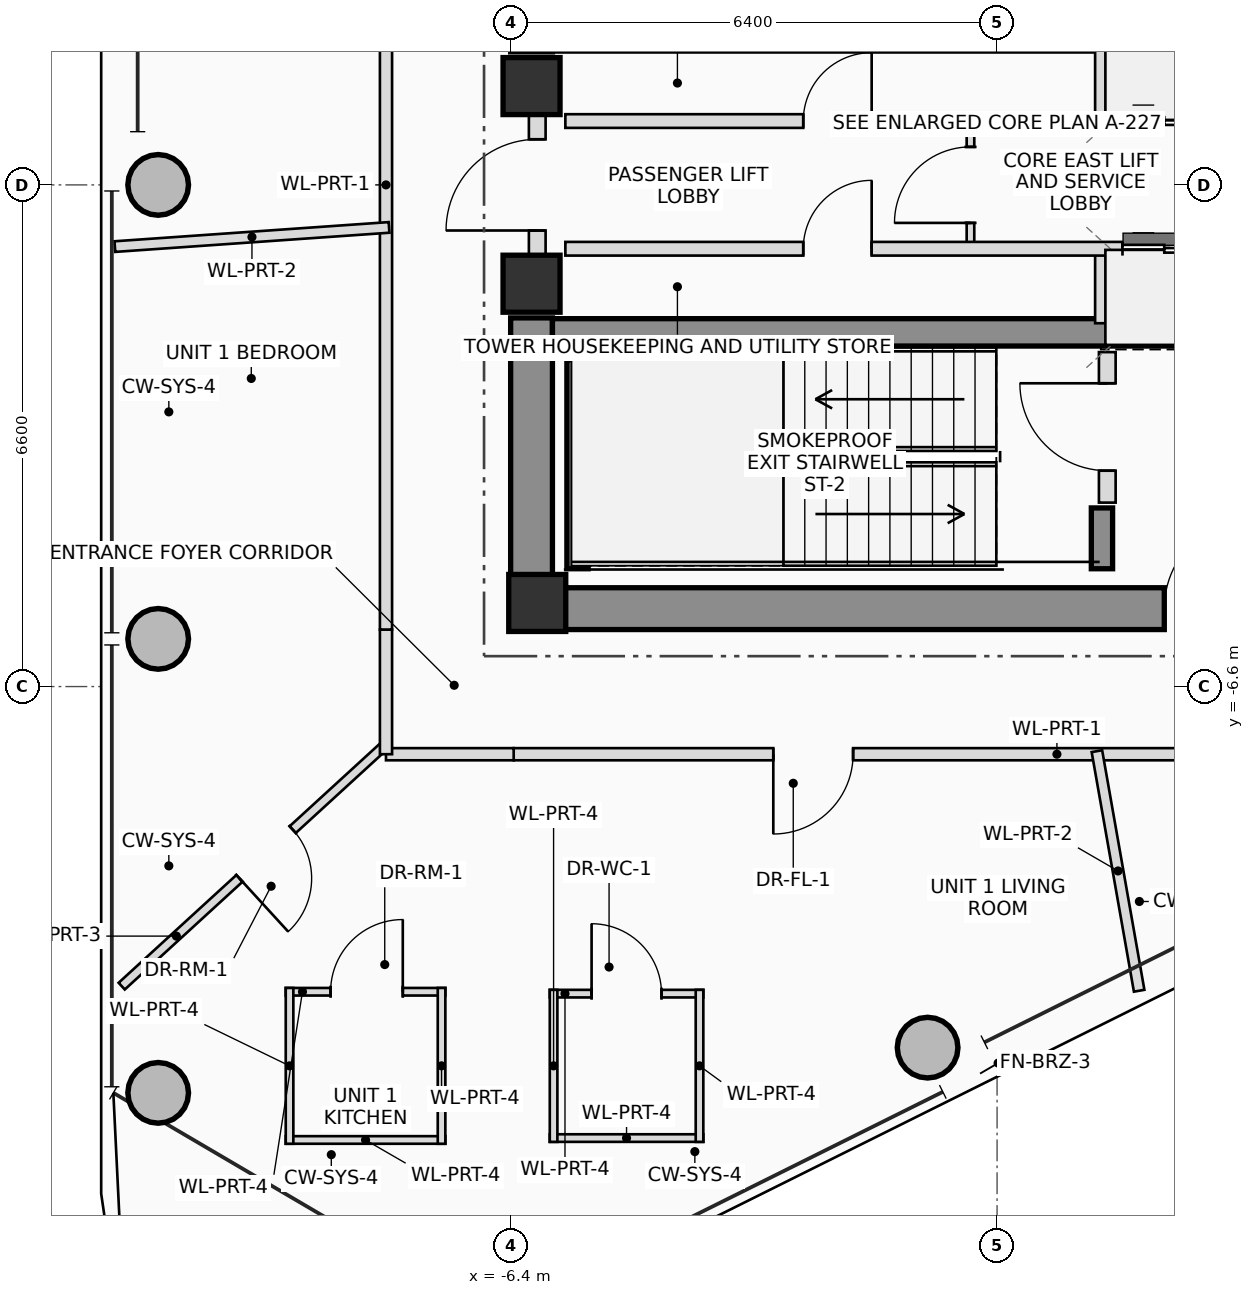
"""IFC4 building model, lengths in metres.
Left out: names, types, materials, properties, quantities, classifications, styles, units other than length and angle.
Written with IfcOpenShell. Run it as: python <this file> out.ifc"""

import sys

from ifc_helpers import new_model, si_unit, direction, frame, frame_2d, origin, origin_2d, place, context, subcontext, project, spatial, rectangle, hollow_circle, extrude, source, transform, mapped, element, fill, save


model = new_model("IFC4")
c1 = context("Model", 3, precision=1e-05, world=origin(), true_north=direction((0.0, 1.0)))
c2 = subcontext(c1, "Body", "Model", "MODEL_VIEW")
j1 = project(units=[si_unit("LENGTHUNIT", "METRE"), si_unit("PLANEANGLEUNIT", "RADIAN")], contexts=[c1])
p1 = place(None, origin())
s1 = spatial("IfcSite", under=j1, at=p1, CompositionType="ELEMENT")
p2 = place(p1, origin())
s2 = spatial("IfcBuilding", under=s1, at=p2, CompositionType="ELEMENT")
p3 = place(p2, frame((0.0, 0.0, 300.2)))
s3 = spatial("IfcBuildingStorey", under=s2, at=p3, CompositionType="ELEMENT", Elevation=300.2)
m1 = source(origin(), c2, "Body", "SweptSolid", [
    extrude(rectangle(XDim=0.75, YDim=0.75, at=origin_2d()), origin(), (0.0, 0.0, 1.0), 3.45),
])
p4 = place(p3, frame((-6.05, -5.5, 0.0), z_axis=(0.0, 0.0, 1.0), x_axis=(1.0, 0.0, 0.0)))
e1 = element("IfcColumn", 1, at=p4, inside=s3, PredefinedType="COLUMN", context=c2, shape_type="MappedRepresentation", body=[
    mapped(m1, transform((0.0, 0.0, 0.0), scale=1.0)),
])
p5 = place(p3, frame((-6.4, -5.575, 0.0), z_axis=(0.0, 0.0, 1.0), x_axis=(1.0, 0.0, 0.0)))
e2 = element("IfcWall", 2, at=p5, inside=s3, PredefinedType="SHEAR", context=c2, shape_type="SweptSolid", body=[
    extrude(rectangle(XDim=12.8, YDim=0.55, at=frame_2d((6.4, 0.0))), origin(), (0.0, 0.0, 1.0), 3.45),
])
p6 = place(p5, frame((8.6, 0.0, 0.0)))
e3 = element("IfcOpeningElement", 3, at=p6, cuts=e2, PredefinedType="OPENING", context=c2, shape_type="SweptSolid", body=[
    extrude(rectangle(XDim=1.2, YDim=2.2, at=frame_2d((0.6, 1.1))), frame((0.0, 0.285, 0.0), z_axis=(0.0, -1.0, 0.0), x_axis=(1.0, 0.0, 0.0)), (0.0, 0.0, 1.0), 0.57),
])
p7 = place(p3, frame((-6.125, -5.3, 0.0), z_axis=(0.0, 0.0, 1.0), x_axis=(0.0, 1.0, 0.0)))
e4 = element("IfcWall", 4, at=p7, inside=s3, PredefinedType="SHEAR", context=c2, shape_type="SweptSolid", body=[
    extrude(rectangle(XDim=3.55, YDim=0.55, at=frame_2d((1.775, 0.0))), origin(), (0.0, 0.0, 1.0), 3.45),
])
p8 = place(p3, frame((-5.85, -1.94, 0.0), z_axis=(0.0, 0.0, 1.0), x_axis=(1.0, 0.0, 0.0)))
e5 = element("IfcWall", 5, at=p8, inside=s3, PredefinedType="SHEAR", context=c2, shape_type="SweptSolid", body=[
    extrude(rectangle(XDim=11.7, YDim=0.36, at=frame_2d((5.85, 0.0))), origin(), (0.0, 0.0, 1.0), 3.45),
])
p9 = place(p3, frame((-5.52, -5.05, 0.0), z_axis=(0.0, 0.0, 1.0), x_axis=(0.0, 1.0, 0.0)))
e6 = element("IfcWall", 6, at=p9, inside=s3, PredefinedType="SHEAR", context=c2, shape_type="SweptSolid", body=[
    extrude(rectangle(XDim=2.75, YDim=0.28, at=frame_2d((1.375, 0.0))), origin(), (0.0, 0.0, 1.0), 3.45),
])
p10 = place(p3, frame((1.38, -5.05, 0.0), z_axis=(0.0, 0.0, 1.0), x_axis=(0.0, 1.0, 0.0)))
e7 = element("IfcWall", 7, at=p10, inside=s3, PredefinedType="SHEAR", context=c2, shape_type="SweptSolid", body=[
    extrude(rectangle(XDim=0.8, YDim=0.28, at=frame_2d((0.4, 0.0))), origin(), (0.0, 0.0, 1.0), 3.45),
])
for number, where, z_axis, x_axis in (
    (8, (-6.125, -1.3, 0.0), (0.0, 0.0, 1.0), (1.0, 0.0, 0.0)),
    (9, (-6.125, 1.3, 0.0), (0.0, 0.0, 1.0), (1.0, 0.0, 0.0)),
):
    element("IfcColumn", number, at=place(p3, frame(where, z_axis=z_axis, x_axis=x_axis)), inside=s3, PredefinedType="COLUMN", context=c2, shape_type="MappedRepresentation", body=[
        mapped(m1, transform((0.0, 0.0, 0.0), scale=1.0)),
    ])
m2 = source(origin(), c2, "Body", "SweptSolid", [
    extrude(hollow_circle(Radius=0.4, WallThickness=0.028, at=origin_2d()), origin(), (0.0, 0.0, 1.0), 3.45),
])
for number, where, z_axis, x_axis in (
    (10, (-0.914, -11.35, 0.0), (0.0, 0.0, 1.0), (1.0, 0.0, 0.0)),
    (11, (-11.037, 0.0, 0.0), (0.0, 0.0, 1.0), (1.0, 0.0, 0.0)),
    (12, (-11.037, -5.973, 0.0), (0.0, 0.0, 1.0), (1.0, 0.0, 0.0)),
    (13, (-11.037, -11.945, 0.0), (0.0, 0.0, 1.0), (1.0, 0.0, 0.0)),
):
    element("IfcColumn", number, at=place(p3, frame(where, z_axis=z_axis, x_axis=x_axis)), inside=s3, PredefinedType="COLUMN", context=c2, shape_type="MappedRepresentation", body=[
        mapped(m2, transform((0.0, 0.0, 0.0), scale=1.0)),
    ])
p11 = place(p3, frame((-6.05, -0.95, 0.0), z_axis=(0.0, 0.0, 1.0), x_axis=(0.0, 1.0, 0.0)))
e14 = element("IfcWall", 14, at=p11, inside=s3, PredefinedType="PLUMBINGWALL", context=c2, shape_type="SweptSolid", body=[
    extrude(rectangle(XDim=1.9, YDim=0.22, at=frame_2d((0.95, 0.0))), origin(), (0.0, 0.0, 1.0), 2.23),
])
p12 = place(p11, frame((0.35, 0.0, 0.0)))
e15 = element("IfcOpeningElement", 15, at=p12, cuts=e14, PredefinedType="OPENING", context=c2, shape_type="SweptSolid", body=[
    extrude(rectangle(XDim=1.2, YDim=2.2, at=frame_2d((0.6, 1.1))), frame((0.0, 0.12, 0.0), z_axis=(0.0, -1.0, 0.0), x_axis=(1.0, 0.0, 0.0)), (0.0, 0.0, 1.0), 0.24),
])
p13 = place(p3, frame((1.45, -4.18, 0.0), z_axis=(0.0, 0.0, 1.0), x_axis=(0.0, 1.0, 0.0)))
e16 = element("IfcWall", 16, at=p13, inside=s3, PredefinedType="PLUMBINGWALL", context=c2, shape_type="SweptSolid", body=[
    extrude(rectangle(XDim=1.98, YDim=0.22, at=frame_2d((0.99, 0.0))), origin(), (0.0, 0.0, 1.0), 3.25),
])
p14 = place(p13, frame((0.42, 0.0, 0.0)))
e17 = element("IfcOpeningElement", 17, at=p14, cuts=e16, PredefinedType="OPENING", context=c2, shape_type="SweptSolid", body=[
    extrude(rectangle(XDim=1.15, YDim=2.15, at=frame_2d((0.575, 1.075))), frame((0.0, 0.12, 0.0), z_axis=(0.0, -1.0, 0.0), x_axis=(1.0, 0.0, 0.0)), (0.0, 0.0, 1.0), 0.24),
])
p15 = place(p3, frame((-0.35, -0.84, 0.0), z_axis=(0.0, 0.0, 1.0), x_axis=(0.0, 1.0, 0.0)))
e18 = element("IfcWall", 18, at=p15, inside=s3, PredefinedType="PARTITIONING", context=c2, shape_type="SweptSolid", body=[
    extrude(rectangle(XDim=1.68, YDim=0.1, at=frame_2d((0.84, 0.0))), origin(), (0.0, 0.0, 1.0), 3.25),
])
p16 = place(p15, frame((0.34, 0.0, 0.0)))
e19 = element("IfcOpeningElement", 19, at=p16, cuts=e18, PredefinedType="OPENING", context=c2, shape_type="SweptSolid", body=[
    extrude(rectangle(XDim=1.0, YDim=2.25, at=frame_2d((0.5, 1.125))), frame((0.0, 0.06, 0.0), z_axis=(0.0, -1.0, 0.0), x_axis=(1.0, 0.0, 0.0)), (0.0, 0.0, 1.0), 0.12),
])
for number, where, z_axis, x_axis in (
    (20, (1.38, 0.84, 0.0), (0.0, 0.0, 1.0), (0.0, 1.0, 0.0)),
    (21, (1.38, -1.82, 0.0), (0.0, 0.0, 1.0), (0.0, 1.0, 0.0)),
):
    element("IfcWall", number, at=place(p3, frame(where, z_axis=z_axis, x_axis=x_axis)), inside=s3, PredefinedType="PLUMBINGWALL", context=c2, shape_type="SweptSolid", body=[
        extrude(rectangle(XDim=0.98, YDim=0.18, at=frame_2d((0.49, 0.0))), origin(), (0.0, 0.0, 1.0), 3.25),
    ])
p17 = place(p3, frame((-5.68, 0.84, 0.0), z_axis=(0.0, 0.0, 1.0), x_axis=(1.0, 0.0, 0.0)))
e22 = element("IfcWall", 22, at=p17, inside=s3, PredefinedType="PLUMBINGWALL", context=c2, shape_type="SweptSolid", body=[
    extrude(rectangle(XDim=11.33, YDim=0.18, at=frame_2d((5.665, 0.0))), origin(), (0.0, 0.0, 1.0), 3.25),
])
p18 = place(p17, frame((3.13, 0.0, 0.0)))
e23 = element("IfcOpeningElement", 23, at=p18, cuts=e22, PredefinedType="OPENING", context=c2, shape_type="SweptSolid", body=[
    extrude(rectangle(XDim=0.9, YDim=2.05, at=frame_2d((0.45, 1.025))), frame((0.0, 0.1, 0.0), z_axis=(0.0, -1.0, 0.0), x_axis=(1.0, 0.0, 0.0)), (0.0, 0.0, 1.0), 0.2),
])
p19 = place(p17, frame((7.33, 0.0, 0.0)))
e24 = element("IfcOpeningElement", 24, at=p19, cuts=e22, PredefinedType="OPENING", context=c2, shape_type="SweptSolid", body=[
    extrude(rectangle(XDim=1.1, YDim=2.2, at=frame_2d((0.55, 1.1))), frame((0.0, 0.1, 0.0), z_axis=(0.0, -1.0, 0.0), x_axis=(1.0, 0.0, 0.0)), (0.0, 0.0, 1.0), 0.2),
])
p20 = place(p17, frame((8.83, 0.0, 0.0)))
e25 = element("IfcOpeningElement", 25, at=p20, cuts=e22, PredefinedType="OPENING", context=c2, shape_type="SweptSolid", body=[
    extrude(rectangle(XDim=1.1, YDim=2.2, at=frame_2d((0.55, 1.1))), frame((0.0, 0.1, 0.0), z_axis=(0.0, -1.0, 0.0), x_axis=(1.0, 0.0, 0.0)), (0.0, 0.0, 1.0), 0.2),
])
p21 = place(p17, frame((10.25, 0.0, 0.0)))
e26 = element("IfcOpeningElement", 26, at=p21, cuts=e22, PredefinedType="OPENING", context=c2, shape_type="SweptSolid", body=[
    extrude(rectangle(XDim=0.9, YDim=2.05, at=frame_2d((0.45, 1.025))), frame((0.0, 0.1, 0.0), z_axis=(0.0, -1.0, 0.0), x_axis=(1.0, 0.0, 0.0)), (0.0, 0.0, 1.0), 0.2),
])
p22 = place(p3, frame((-5.68, -0.84, 0.0), z_axis=(0.0, 0.0, 1.0), x_axis=(1.0, 0.0, 0.0)))
e27 = element("IfcWall", 27, at=p22, inside=s3, PredefinedType="PLUMBINGWALL", context=c2, shape_type="SweptSolid", body=[
    extrude(rectangle(XDim=11.33, YDim=0.18, at=frame_2d((5.665, 0.0))), origin(), (0.0, 0.0, 1.0), 3.25),
])
p23 = place(p22, frame((3.13, 0.0, 0.0)))
e28 = element("IfcOpeningElement", 28, at=p23, cuts=e27, PredefinedType="OPENING", context=c2, shape_type="SweptSolid", body=[
    extrude(rectangle(XDim=0.9, YDim=2.05, at=frame_2d((0.45, 1.025))), frame((0.0, 0.1, 0.0), z_axis=(0.0, -1.0, 0.0), x_axis=(1.0, 0.0, 0.0)), (0.0, 0.0, 1.0), 0.2),
])
p24 = place(p22, frame((7.33, 0.0, 0.0)))
e29 = element("IfcOpeningElement", 29, at=p24, cuts=e27, PredefinedType="OPENING", context=c2, shape_type="SweptSolid", body=[
    extrude(rectangle(XDim=1.1, YDim=2.2, at=frame_2d((0.55, 1.1))), frame((0.0, 0.1, 0.0), z_axis=(0.0, -1.0, 0.0), x_axis=(1.0, 0.0, 0.0)), (0.0, 0.0, 1.0), 0.2),
])
p25 = place(p22, frame((9.58, 0.0, 0.0)))
e30 = element("IfcOpeningElement", 30, at=p25, cuts=e27, PredefinedType="OPENING", context=c2, shape_type="SweptSolid", body=[
    extrude(rectangle(XDim=0.9, YDim=2.05, at=frame_2d((0.45, 1.025))), frame((0.0, 0.1, 0.0), z_axis=(0.0, -1.0, 0.0), x_axis=(1.0, 0.0, 0.0)), (0.0, 0.0, 1.0), 0.2),
])
p26 = place(p3, frame((-8.07, -7.386, 0.0), z_axis=(0.0, 0.0, 1.0), x_axis=(-0.737657036201, -0.675175604523, 0.0)))
e31 = element("IfcWall", 31, at=p26, inside=s3, PredefinedType="PARTITIONING", context=c2, shape_type="SweptSolid", body=[
    extrude(rectangle(XDim=4.673, YDim=0.12, at=frame_2d((2.337, 0.0))), origin(), (0.0, 0.0, 1.0), 2.815),
])
p27 = place(p26, frame((1.623, 0.0, 0.0)))
e32 = element("IfcOpeningElement", 32, at=p27, cuts=e31, PredefinedType="OPENING", context=c2, shape_type="SweptSolid", body=[
    extrude(rectangle(XDim=0.95, YDim=2.1, at=frame_2d((0.475, 1.05))), frame((0.0, 0.07, 0.0), z_axis=(0.0, -1.0, 0.0), x_axis=(1.0, 0.0, 0.0)), (0.0, 0.0, 1.0), 0.14),
])
p28 = place(p3, frame((-5.885, -10.64, 0.0), z_axis=(0.0, 0.0, 1.0), x_axis=(1.0, 0.0, 0.0)))
e33 = element("IfcWall", 33, at=p28, inside=s3, PredefinedType="PARTITIONING", context=c2, shape_type="SweptSolid", body=[
    extrude(rectangle(XDim=2.02, YDim=0.1, at=frame_2d((1.01, 0.0))), origin(), (0.0, 0.0, 1.0), 2.905),
])
p29 = place(p28, frame((0.55, 0.0, 0.0)))
e34 = element("IfcOpeningElement", 34, at=p29, cuts=e33, PredefinedType="OPENING", context=c2, shape_type="SweptSolid", body=[
    extrude(rectangle(XDim=0.92, YDim=2.1, at=frame_2d((0.46, 1.05))), frame((0.0, 0.06, 0.0), z_axis=(0.0, -1.0, 0.0), x_axis=(1.0, 0.0, 0.0)), (0.0, 0.0, 1.0), 0.12),
])
p30 = place(p3, frame((-3.865, -12.54, 0.0), z_axis=(0.0, 0.0, 1.0), x_axis=(-1.0, 0.0, 0.0)))
e35 = element("IfcWall", 35, at=p30, inside=s3, PredefinedType="PARTITIONING", context=c2, shape_type="SweptSolid", body=[
    extrude(rectangle(XDim=2.02, YDim=0.1, at=frame_2d((1.01, 0.0))), origin(), (0.0, 0.0, 1.0), 3.25),
])
for number, where, z_axis, x_axis in (
    (36, (-3.915, -10.59, 0.0), (0.0, 0.0, 1.0), (0.0, -1.0, 0.0)),
    (37, (-5.835, -12.59, 0.0), (0.0, 0.0, 1.0), (0.0, 1.0, 0.0)),
):
    element("IfcWall", number, at=place(p3, frame(where, z_axis=z_axis, x_axis=x_axis)), inside=s3, PredefinedType="PARTITIONING", context=c2, shape_type="SweptSolid", body=[
        extrude(rectangle(XDim=2.0, YDim=0.1, at=frame_2d((1.0, 0.0))), origin(), (0.0, 0.0, 1.0), 2.905),
    ])
p31 = place(p3, frame((-9.359, -10.615, 0.0), z_axis=(0.0, 0.0, 1.0), x_axis=(1.0, 0.0, 0.0)))
e38 = element("IfcWall", 38, at=p31, inside=s3, PredefinedType="PARTITIONING", context=c2, shape_type="SweptSolid", body=[
    extrude(rectangle(XDim=2.1, YDim=0.1, at=frame_2d((1.05, 0.0))), origin(), (0.0, 0.0, 1.0), 2.905),
])
p32 = place(p31, frame((0.59, 0.0, 0.0)))
e39 = element("IfcOpeningElement", 39, at=p32, cuts=e38, PredefinedType="OPENING", context=c2, shape_type="SweptSolid", body=[
    extrude(rectangle(XDim=0.95, YDim=2.1, at=frame_2d((0.475, 1.05))), frame((0.0, 0.06, 0.0), z_axis=(0.0, -1.0, 0.0), x_axis=(1.0, 0.0, 0.0)), (0.0, 0.0, 1.0), 0.12),
])
p33 = place(p3, frame((-7.259, -12.565, 0.0), z_axis=(0.0, 0.0, 1.0), x_axis=(-1.0, 0.0, 0.0)))
e40 = element("IfcWall", 40, at=p33, inside=s3, PredefinedType="PARTITIONING", context=c2, shape_type="SweptSolid", body=[
    extrude(rectangle(XDim=2.1, YDim=0.1, at=frame_2d((1.05, 0.0))), origin(), (0.0, 0.0, 1.0), 3.25),
])
for number, where, z_axis, x_axis in (
    (41, (-7.309, -10.565, 0.0), (0.0, 0.0, 1.0), (0.0, -1.0, 0.0)),
    (42, (-9.309, -12.615, 0.0), (0.0, 0.0, 1.0), (0.0, 1.0, 0.0)),
):
    element("IfcWall", number, at=place(p3, frame(where, z_axis=z_axis, x_axis=x_axis)), inside=s3, PredefinedType="PARTITIONING", context=c2, shape_type="SweptSolid", body=[
        extrude(rectangle(XDim=2.05, YDim=0.1, at=frame_2d((1.025, 0.0))), origin(), (0.0, 0.0, 1.0), 2.905),
    ])
p34 = place(p3, frame((3.319, -7.49, 0.0), z_axis=(0.0, 0.0, 1.0), x_axis=(-1.0, 0.0, 0.0)))
e43 = element("IfcWall", 43, at=p34, inside=s3, PredefinedType="PARTITIONING", context=c2, shape_type="SweptSolid", body=[
    extrude(rectangle(XDim=9.679, YDim=0.16, at=frame_2d((4.84, 0.0))), origin(), (0.0, 0.0, 1.0), 2.655),
])
p35 = place(p34, frame((5.213, 0.0, 0.0)))
e44 = element("IfcOpeningElement", 44, at=p35, cuts=e43, PredefinedType="OPENING", context=c2, shape_type="SweptSolid", body=[
    extrude(rectangle(XDim=1.05, YDim=2.2, at=frame_2d((0.525, 1.1))), frame((0.0, 0.09, 0.0), z_axis=(0.0, -1.0, 0.0), x_axis=(1.0, 0.0, 0.0)), (0.0, 0.0, 1.0), 0.18),
])
p36 = place(p3, frame((-6.36, -7.49, 0.0), z_axis=(0.0, 0.0, 1.0), x_axis=(-1.0, 0.0, 0.0)))
e45 = element("IfcWall", 45, at=p36, inside=s3, PredefinedType="PARTITIONING", context=c2, shape_type="SweptSolid", body=[
    extrude(rectangle(XDim=1.68, YDim=0.16, at=frame_2d((0.84, 0.0))), origin(), (0.0, 0.0, 1.0), 2.655),
])
p37 = place(p3, frame((-8.04, -7.49, 0.0), z_axis=(0.0, 0.0, 1.0), x_axis=(0.0, 1.0, 0.0)))
e46 = element("IfcWall", 46, at=p37, inside=s3, PredefinedType="PARTITIONING", context=c2, shape_type="SweptSolid", body=[
    extrude(rectangle(XDim=1.64, YDim=0.16, at=frame_2d((0.82, 0.0))), origin(), (0.0, 0.0, 1.0), 3.25),
])
p38 = place(p3, frame((-8.04, -5.85, 0.0), z_axis=(0.0, 0.0, 1.0), x_axis=(0.0, 1.0, 0.0)))
e47 = element("IfcWall", 47, at=p38, inside=s3, PredefinedType="PARTITIONING", context=c2, shape_type="SweptSolid", body=[
    extrude(rectangle(XDim=11.7, YDim=0.16, at=frame_2d((5.85, 0.0))), origin(), (0.0, 0.0, 1.0), 2.655),
])
p39 = place(p3, frame((-8.0, -0.559, 0.0), z_axis=(0.0, 0.0, 1.0), x_axis=(-0.99756047181, -0.069807629118, 0.0)))
e48 = element("IfcWall", 48, at=p39, inside=s3, PredefinedType="PARTITIONING", context=c2, shape_type="SweptSolid", body=[
    extrude(rectangle(XDim=3.616, YDim=0.14, at=frame_2d((1.808, 0.0))), origin(), (0.0, 0.0, 1.0), 2.655),
])
p40 = place(p3, frame((1.314, -7.45, 0.0), z_axis=(0.0, 0.0, 1.0), x_axis=(0.173619966433, -0.984812726997, 0.0)))
e49 = element("IfcWall", 49, at=p40, inside=s3, PredefinedType="PARTITIONING", context=c2, shape_type="SweptSolid", body=[
    extrude(rectangle(XDim=3.2, YDim=0.14, at=frame_2d((1.6, 0.0))), origin(), (0.0, 0.0, 1.0), 2.815),
])
p41 = place(p6, origin())
e50 = element("IfcDoor", 50, at=p41, inside=s3, OperationType="SINGLE_SWING_RIGHT", PredefinedType="DOOR", context=c2, shape_type="SweptSolid", body=[
    extrude(rectangle(XDim=1.2, YDim=2.2, at=frame_2d((0.6, 1.1))), frame((0.0, 0.025, 0.0), z_axis=(0.0, -1.0, 0.0), x_axis=(1.0, 0.0, 0.0)), (0.0, 0.0, 1.0), 0.05),
])
fill(e3, e50)
p42 = place(p12, origin())
e51 = element("IfcDoor", 51, at=p42, inside=s3, OperationType="SINGLE_SWING_LEFT", PredefinedType="DOOR", context=c2, shape_type="SweptSolid", body=[
    extrude(rectangle(XDim=1.2, YDim=2.2, at=frame_2d((0.6, 1.1))), frame((0.0, 0.025, 0.0), z_axis=(0.0, -1.0, 0.0), x_axis=(1.0, 0.0, 0.0)), (0.0, 0.0, 1.0), 0.05),
])
fill(e15, e51)
p43 = place(p14, origin())
e52 = element("IfcDoor", 52, at=p43, inside=s3, OperationType="SINGLE_SWING_RIGHT", PredefinedType="DOOR", context=c2, shape_type="SweptSolid", body=[
    extrude(rectangle(XDim=1.15, YDim=2.15, at=frame_2d((0.575, 1.075))), frame((0.0, 0.025, 0.0), z_axis=(0.0, -1.0, 0.0), x_axis=(1.0, 0.0, 0.0)), (0.0, 0.0, 1.0), 0.05),
])
fill(e17, e52)
p44 = place(p16, origin())
e53 = element("IfcDoor", 53, at=p44, inside=s3, OperationType="SINGLE_SWING_LEFT", PredefinedType="DOOR", context=c2, shape_type="SweptSolid", body=[
    extrude(rectangle(XDim=1.0, YDim=2.25, at=frame_2d((0.5, 1.125))), frame((0.0, 0.025, 0.0), z_axis=(0.0, -1.0, 0.0), x_axis=(1.0, 0.0, 0.0)), (0.0, 0.0, 1.0), 0.05),
])
fill(e19, e53)
p45 = place(p18, origin())
e54 = element("IfcDoor", 54, at=p45, inside=s3, OperationType="SINGLE_SWING_RIGHT", PredefinedType="DOOR", context=c2, shape_type="SweptSolid", body=[
    extrude(rectangle(XDim=0.9, YDim=2.05, at=frame_2d((0.45, 1.025))), frame((0.0, 0.025, 0.0), z_axis=(0.0, -1.0, 0.0), x_axis=(1.0, 0.0, 0.0)), (0.0, 0.0, 1.0), 0.05),
])
fill(e23, e54)
p46 = place(p19, origin())
e55 = element("IfcDoor", 55, at=p46, inside=s3, OperationType="DOUBLE_DOOR_SLIDING", PredefinedType="DOOR", context=c2, shape_type="SweptSolid", body=[
    extrude(rectangle(XDim=1.1, YDim=2.2, at=frame_2d((0.55, 1.1))), frame((0.0, 0.025, 0.0), z_axis=(0.0, -1.0, 0.0), x_axis=(1.0, 0.0, 0.0)), (0.0, 0.0, 1.0), 0.05),
])
fill(e24, e55)
p47 = place(p23, origin())
e56 = element("IfcDoor", 56, at=p47, inside=s3, OperationType="SINGLE_SWING_RIGHT", PredefinedType="DOOR", context=c2, shape_type="SweptSolid", body=[
    extrude(rectangle(XDim=0.9, YDim=2.05, at=frame_2d((0.45, 1.025))), frame((0.0, 0.025, 0.0), z_axis=(0.0, -1.0, 0.0), x_axis=(1.0, 0.0, 0.0)), (0.0, 0.0, 1.0), 0.05),
])
fill(e28, e56)
p48 = place(p24, origin())
e57 = element("IfcDoor", 57, at=p48, inside=s3, OperationType="DOUBLE_DOOR_SLIDING", PredefinedType="DOOR", context=c2, shape_type="SweptSolid", body=[
    extrude(rectangle(XDim=1.1, YDim=2.2, at=frame_2d((0.55, 1.1))), frame((0.0, 0.025, 0.0), z_axis=(0.0, -1.0, 0.0), x_axis=(1.0, 0.0, 0.0)), (0.0, 0.0, 1.0), 0.05),
])
fill(e29, e57)
p49 = place(p27, origin())
e58 = element("IfcDoor", 58, at=p49, inside=s3, OperationType="SINGLE_SWING_RIGHT", PredefinedType="DOOR", context=c2, shape_type="SweptSolid", body=[
    extrude(rectangle(XDim=0.95, YDim=2.1, at=frame_2d((0.475, 1.05))), frame((0.0, 0.025, 0.0), z_axis=(0.0, -1.0, 0.0), x_axis=(1.0, 0.0, 0.0)), (0.0, 0.0, 1.0), 0.05),
])
fill(e32, e58)
p50 = place(p29, origin())
e59 = element("IfcDoor", 59, at=p50, inside=s3, OperationType="SINGLE_SWING_LEFT", PredefinedType="DOOR", context=c2, shape_type="SweptSolid", body=[
    extrude(rectangle(XDim=0.92, YDim=2.1, at=frame_2d((0.46, 1.05))), frame((0.0, 0.025, 0.0), z_axis=(0.0, -1.0, 0.0), x_axis=(1.0, 0.0, 0.0)), (0.0, 0.0, 1.0), 0.05),
])
fill(e34, e59)
p51 = place(p32, origin())
e60 = element("IfcDoor", 60, at=p51, inside=s3, OperationType="SINGLE_SWING_RIGHT", PredefinedType="DOOR", context=c2, shape_type="SweptSolid", body=[
    extrude(rectangle(XDim=0.95, YDim=2.1, at=frame_2d((0.475, 1.05))), frame((0.0, 0.025, 0.0), z_axis=(0.0, -1.0, 0.0), x_axis=(1.0, 0.0, 0.0)), (0.0, 0.0, 1.0), 0.05),
])
fill(e39, e60)
p52 = place(p35, origin())
e61 = element("IfcDoor", 61, at=p52, inside=s3, OperationType="SINGLE_SWING_RIGHT", PredefinedType="DOOR", context=c2, shape_type="SweptSolid", body=[
    extrude(rectangle(XDim=1.05, YDim=2.2, at=frame_2d((0.525, 1.1))), frame((0.0, 0.025, 0.0), z_axis=(0.0, -1.0, 0.0), x_axis=(1.0, 0.0, 0.0)), (0.0, 0.0, 1.0), 0.05),
])
fill(e44, e61)
save(model, sys.argv[1])
